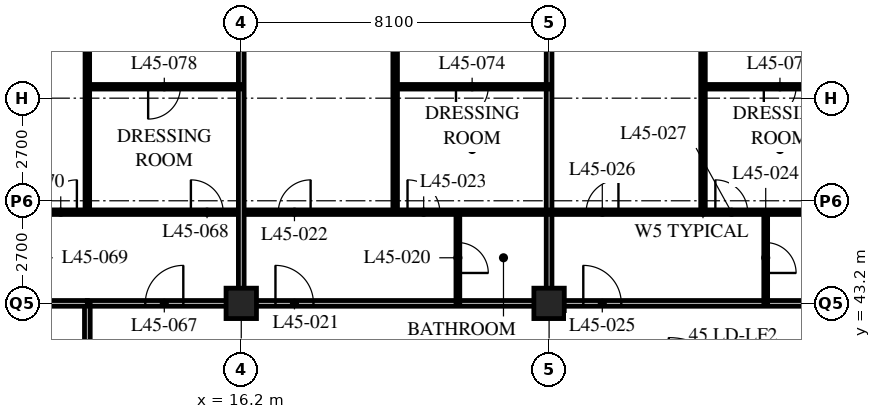
"""IFC4 building model, lengths in metres.
Left out: names, types, materials, properties, quantities, classifications, styles, units other than length and angle.
Written with IfcOpenShell. Run it as: python <this file> out.ifc"""

import sys

from ifc_helpers import new_model, si_unit, direction, frame, frame_2d, origin, origin_2d, place, context, subcontext, project, spatial, rectangle, hollow_rectangle, extrude, element, fill, save


model = new_model("IFC4")
c1 = context("Model", 3, precision=1e-05, world=origin(), true_north=direction((0.0, 1.0)))
c2 = subcontext(c1, "Body", "Model", "MODEL_VIEW")
j1 = project(units=[si_unit("LENGTHUNIT", "METRE"), si_unit("PLANEANGLEUNIT", "RADIAN")], contexts=[c1])
p1 = place(None, origin())
s1 = spatial("IfcSite", under=j1, at=p1, CompositionType="ELEMENT")
p2 = place(p1, origin())
s2 = spatial("IfcBuilding", under=s1, at=p2, CompositionType="ELEMENT")
p3 = place(p2, frame((0.0, 0.0, 177.6)))
s3 = spatial("IfcBuildingStorey", under=s2, at=p3, CompositionType="ELEMENT", Elevation=177.6)
for number, where, z_axis, x_axis in (
    (1, (16.2, 43.2, 0.0), (0.0, 0.0, 1.0), (1.0, 0.0, 0.0)),
    (2, (24.3, 43.2, 0.0), (0.0, 0.0, 1.0), (1.0, 0.0, 0.0)),
):
    element("IfcColumn", number, at=place(p3, frame(where, z_axis=z_axis, x_axis=x_axis)), inside=s3, PredefinedType="COLUMN", context=c2, shape_type="SweptSolid", body=[
        extrude(hollow_rectangle(XDim=0.8, YDim=0.8, WallThickness=0.08, at=origin_2d()), origin(), (0.0, 0.0, 1.0), 3.6),
    ])
p4 = place(p3, frame((12.15, 43.2, 0.0), z_axis=(0.0, 0.0, 1.0), x_axis=(1.0, 0.0, 0.0)))
e3 = element("IfcWall", 3, at=p4, inside=s3, PredefinedType="PARTITIONING", context=c2, shape_type="SweptSolid", body=[
    extrude(rectangle(XDim=32.4, YDim=0.15, at=frame_2d((16.2, 0.0))), origin(), (0.0, 0.0, 1.0), 2.778),
])
p5 = place(p4, frame((4.95, 0.0, 0.0)))
e4 = element("IfcOpeningElement", 4, at=p5, cuts=e3, PredefinedType="OPENING", context=c2, shape_type="SweptSolid", body=[
    extrude(rectangle(XDim=1.0, YDim=2.1, at=frame_2d((0.5, 1.05))), frame((0.0, 0.085, 0.0), z_axis=(0.0, -1.0, 0.0), x_axis=(1.0, 0.0, 0.0)), (0.0, 0.0, 1.0), 0.17),
])
p6 = place(p4, frame((13.05, 0.0, 0.0)))
e5 = element("IfcOpeningElement", 5, at=p6, cuts=e3, PredefinedType="OPENING", context=c2, shape_type="SweptSolid", body=[
    extrude(rectangle(XDim=1.0, YDim=2.1, at=frame_2d((0.5, 1.05))), frame((0.0, 0.085, 0.0), z_axis=(0.0, -1.0, 0.0), x_axis=(1.0, 0.0, 0.0)), (0.0, 0.0, 1.0), 0.17),
])
p7 = place(p4, frame((21.15, 0.0, 0.0)))
e6 = element("IfcOpeningElement", 6, at=p7, cuts=e3, PredefinedType="OPENING", context=c2, shape_type="SweptSolid", body=[
    extrude(rectangle(XDim=1.0, YDim=2.1, at=frame_2d((0.5, 1.05))), frame((0.0, 0.085, 0.0), z_axis=(0.0, -1.0, 0.0), x_axis=(1.0, 0.0, 0.0)), (0.0, 0.0, 1.0), 0.17),
])
p8 = place(p4, frame((29.875, 0.0, 0.0)))
e7 = element("IfcOpeningElement", 7, at=p8, cuts=e3, PredefinedType="OPENING", context=c2, shape_type="SweptSolid", body=[
    extrude(rectangle(XDim=1.0, YDim=2.1, at=frame_2d((0.5, 1.05))), frame((0.0, 0.085, 0.0), z_axis=(0.0, -1.0, 0.0), x_axis=(1.0, 0.0, 0.0)), (0.0, 0.0, 1.0), 0.17),
])
p9 = place(p4, frame((1.525, 0.0, 0.0)))
e8 = element("IfcOpeningElement", 8, at=p9, cuts=e3, PredefinedType="OPENING", context=c2, shape_type="SweptSolid", body=[
    extrude(rectangle(XDim=1.0, YDim=2.1, at=frame_2d((0.5, 1.05))), frame((0.0, 0.085, 0.0), z_axis=(0.0, -1.0, 0.0), x_axis=(1.0, 0.0, 0.0)), (0.0, 0.0, 1.0), 0.17),
])
p10 = place(p3, frame((12.15, 18.9, 0.0), z_axis=(0.0, 0.0, 1.0), x_axis=(0.0, 1.0, 0.0)))
e9 = element("IfcWall", 9, at=p10, inside=s3, PredefinedType="PARTITIONING", context=c2, shape_type="SweptSolid", body=[
    extrude(rectangle(XDim=24.3, YDim=0.15, at=frame_2d((12.15, 0.0))), origin(), (0.0, 0.0, 1.0), 3.39),
])
p11 = place(p10, frame((2.35, 0.0, 0.0)))
e10 = element("IfcOpeningElement", 10, at=p11, cuts=e9, PredefinedType="OPENING", context=c2, shape_type="SweptSolid", body=[
    extrude(rectangle(XDim=1.0, YDim=2.1, at=frame_2d((0.5, 1.05))), frame((0.0, 0.085, 0.0), z_axis=(0.0, -1.0, 0.0), x_axis=(1.0, 0.0, 0.0)), (0.0, 0.0, 1.0), 0.17),
])
p12 = place(p10, frame((6.4, 0.0, 0.0)))
e11 = element("IfcOpeningElement", 11, at=p12, cuts=e9, PredefinedType="OPENING", context=c2, shape_type="SweptSolid", body=[
    extrude(rectangle(XDim=1.0, YDim=2.1, at=frame_2d((0.5, 1.05))), frame((0.0, 0.085, 0.0), z_axis=(0.0, -1.0, 0.0), x_axis=(1.0, 0.0, 0.0)), (0.0, 0.0, 1.0), 0.17),
])
p13 = place(p10, frame((8.5, 0.0, 0.0)))
e12 = element("IfcOpeningElement", 12, at=p13, cuts=e9, PredefinedType="OPENING", context=c2, shape_type="SweptSolid", body=[
    extrude(rectangle(XDim=1.0, YDim=2.1, at=frame_2d((0.5, 1.05))), frame((0.0, 0.085, 0.0), z_axis=(0.0, -1.0, 0.0), x_axis=(1.0, 0.0, 0.0)), (0.0, 0.0, 1.0), 0.17),
])
p14 = place(p10, frame((16.6, 0.0, 0.0)))
e13 = element("IfcOpeningElement", 13, at=p14, cuts=e9, PredefinedType="OPENING", context=c2, shape_type="SweptSolid", body=[
    extrude(rectangle(XDim=1.0, YDim=2.1, at=frame_2d((0.5, 1.05))), frame((0.0, 0.085, 0.0), z_axis=(0.0, -1.0, 0.0), x_axis=(1.0, 0.0, 0.0)), (0.0, 0.0, 1.0), 0.17),
])
p15 = place(p3, frame((21.9, 43.2, 0.0), z_axis=(0.0, 0.0, 1.0), x_axis=(0.0, 1.0, 0.0)))
e14 = element("IfcWall", 14, at=p15, inside=s3, PredefinedType="PARTITIONING", context=c2, shape_type="SweptSolid", body=[
    extrude(rectangle(XDim=2.4, YDim=0.1, at=frame_2d((1.2, 0.0))), origin(), (0.0, 0.0, 1.0), 3.39),
])
p16 = place(p15, frame((0.8, 0.0, 0.0)))
e15 = element("IfcOpeningElement", 15, at=p16, cuts=e14, PredefinedType="OPENING", context=c2, shape_type="SweptSolid", body=[
    extrude(rectangle(XDim=0.8, YDim=2.1, at=frame_2d((0.4, 1.05))), frame((0.0, 0.06, 0.0), z_axis=(0.0, -1.0, 0.0), x_axis=(1.0, 0.0, 0.0)), (0.0, 0.0, 1.0), 0.12),
])
p17 = place(p3, frame((20.25, 45.6, 0.0), z_axis=(0.0, 0.0, 1.0), x_axis=(0.0, 1.0, 0.0)))
e16 = element("IfcWall", 16, at=p17, inside=s3, PredefinedType="PARTITIONING", context=c2, shape_type="SweptSolid", body=[
    extrude(rectangle(XDim=13.5, YDim=0.12, at=frame_2d((6.75, 0.0))), origin(), (0.0, 0.0, 1.0), 3.39),
])
p18 = place(p3, frame((24.3, 43.2, 0.0), z_axis=(0.0, 0.0, 1.0), x_axis=(0.0, 1.0, 0.0)))
e17 = element("IfcWall", 17, at=p18, inside=s3, PredefinedType="PARTITIONING", context=c2, shape_type="SweptSolid", body=[
    extrude(rectangle(XDim=15.9, YDim=0.15, at=frame_2d((7.95, 0.0))), origin(), (0.0, 0.0, 1.0), 2.778),
])
p19 = place(p3, frame((30.0, 43.2, 0.0), z_axis=(0.0, 0.0, 1.0), x_axis=(0.0, 1.0, 0.0)))
e18 = element("IfcWall", 18, at=p19, inside=s3, PredefinedType="PARTITIONING", context=c2, shape_type="SweptSolid", body=[
    extrude(rectangle(XDim=2.4, YDim=0.1, at=frame_2d((1.2, 0.0))), origin(), (0.0, 0.0, 1.0), 3.39),
])
p20 = place(p19, frame((0.8, 0.0, 0.0)))
e19 = element("IfcOpeningElement", 19, at=p20, cuts=e18, PredefinedType="OPENING", context=c2, shape_type="SweptSolid", body=[
    extrude(rectangle(XDim=0.8, YDim=2.1, at=frame_2d((0.4, 1.05))), frame((0.0, 0.06, 0.0), z_axis=(0.0, -1.0, 0.0), x_axis=(1.0, 0.0, 0.0)), (0.0, 0.0, 1.0), 0.12),
])
p21 = place(p3, frame((28.35, 45.6, 0.0), z_axis=(0.0, 0.0, 1.0), x_axis=(0.0, 1.0, 0.0)))
e20 = element("IfcWall", 20, at=p21, inside=s3, PredefinedType="PARTITIONING", context=c2, shape_type="SweptSolid", body=[
    extrude(rectangle(XDim=13.5, YDim=0.12, at=frame_2d((6.75, 0.0))), origin(), (0.0, 0.0, 1.0), 3.39),
])
p22 = place(p3, frame((8.15, 45.6, 0.0), z_axis=(0.0, 0.0, 1.0), x_axis=(1.0, 0.0, 0.0)))
e21 = element("IfcWall", 21, at=p22, inside=s3, PredefinedType="PARTITIONING", context=c2, shape_type="SweptSolid", body=[
    extrude(rectangle(XDim=40.4, YDim=0.12, at=frame_2d((20.2, 0.0))), origin(), (0.0, 0.0, 1.0), 3.39),
])
p23 = place(p22, frame((9.025, 0.0, 0.0)))
e22 = element("IfcOpeningElement", 22, at=p23, cuts=e21, PredefinedType="OPENING", context=c2, shape_type="SweptSolid", body=[
    extrude(rectangle(XDim=0.85, YDim=2.1, at=frame_2d((0.425, 1.05))), frame((0.0, 0.07, 0.0), z_axis=(0.0, -1.0, 0.0), x_axis=(1.0, 0.0, 0.0)), (0.0, 0.0, 1.0), 0.14),
])
p24 = place(p22, frame((12.425, 0.0, 0.0)))
e23 = element("IfcOpeningElement", 23, at=p24, cuts=e21, PredefinedType="OPENING", context=c2, shape_type="SweptSolid", body=[
    extrude(rectangle(XDim=0.85, YDim=2.1, at=frame_2d((0.425, 1.05))), frame((0.0, 0.07, 0.0), z_axis=(0.0, -1.0, 0.0), x_axis=(1.0, 0.0, 0.0)), (0.0, 0.0, 1.0), 0.14),
])
p25 = place(p22, frame((17.125, 0.0, 0.0)))
e24 = element("IfcOpeningElement", 24, at=p25, cuts=e21, PredefinedType="OPENING", context=c2, shape_type="SweptSolid", body=[
    extrude(rectangle(XDim=0.85, YDim=2.1, at=frame_2d((0.425, 1.05))), frame((0.0, 0.07, 0.0), z_axis=(0.0, -1.0, 0.0), x_axis=(1.0, 0.0, 0.0)), (0.0, 0.0, 1.0), 0.14),
])
p26 = place(p22, frame((20.525, 0.0, 0.0)))
e25 = element("IfcOpeningElement", 25, at=p26, cuts=e21, PredefinedType="OPENING", context=c2, shape_type="SweptSolid", body=[
    extrude(rectangle(XDim=0.85, YDim=2.1, at=frame_2d((0.425, 1.05))), frame((0.0, 0.07, 0.0), z_axis=(0.0, -1.0, 0.0), x_axis=(1.0, 0.0, 0.0)), (0.0, 0.0, 1.0), 0.14),
])
p27 = place(p22, frame((25.225, 0.0, 0.0)))
e26 = element("IfcOpeningElement", 26, at=p27, cuts=e21, PredefinedType="OPENING", context=c2, shape_type="SweptSolid", body=[
    extrude(rectangle(XDim=0.85, YDim=2.1, at=frame_2d((0.425, 1.05))), frame((0.0, 0.07, 0.0), z_axis=(0.0, -1.0, 0.0), x_axis=(1.0, 0.0, 0.0)), (0.0, 0.0, 1.0), 0.14),
])
p28 = place(p22, frame((28.625, 0.0, 0.0)))
e27 = element("IfcOpeningElement", 27, at=p28, cuts=e21, PredefinedType="OPENING", context=c2, shape_type="SweptSolid", body=[
    extrude(rectangle(XDim=0.85, YDim=2.1, at=frame_2d((0.425, 1.05))), frame((0.0, 0.07, 0.0), z_axis=(0.0, -1.0, 0.0), x_axis=(1.0, 0.0, 0.0)), (0.0, 0.0, 1.0), 0.14),
])
p29 = place(p22, frame((32.825, 0.0, 0.0)))
e28 = element("IfcOpeningElement", 28, at=p29, cuts=e21, PredefinedType="OPENING", context=c2, shape_type="SweptSolid", body=[
    extrude(rectangle(XDim=0.85, YDim=2.1, at=frame_2d((0.425, 1.05))), frame((0.0, 0.07, 0.0), z_axis=(0.0, -1.0, 0.0), x_axis=(1.0, 0.0, 0.0)), (0.0, 0.0, 1.0), 0.14),
])
p30 = place(p22, frame((36.675, 0.0, 0.0)))
e29 = element("IfcOpeningElement", 29, at=p30, cuts=e21, PredefinedType="OPENING", context=c2, shape_type="SweptSolid", body=[
    extrude(rectangle(XDim=0.85, YDim=2.1, at=frame_2d((0.425, 1.05))), frame((0.0, 0.07, 0.0), z_axis=(0.0, -1.0, 0.0), x_axis=(1.0, 0.0, 0.0)), (0.0, 0.0, 1.0), 0.14),
])
p31 = place(p22, frame((6.725, 0.0, 0.0)))
e30 = element("IfcOpeningElement", 30, at=p31, cuts=e21, PredefinedType="OPENING", context=c2, shape_type="SweptSolid", body=[
    extrude(rectangle(XDim=0.85, YDim=2.1, at=frame_2d((0.425, 1.05))), frame((0.0, 0.07, 0.0), z_axis=(0.0, -1.0, 0.0), x_axis=(1.0, 0.0, 0.0)), (0.0, 0.0, 1.0), 0.14),
])
p32 = place(p22, frame((2.875, 0.0, 0.0)))
e31 = element("IfcOpeningElement", 31, at=p32, cuts=e21, PredefinedType="OPENING", context=c2, shape_type="SweptSolid", body=[
    extrude(rectangle(XDim=0.85, YDim=2.1, at=frame_2d((0.425, 1.05))), frame((0.0, 0.07, 0.0), z_axis=(0.0, -1.0, 0.0), x_axis=(1.0, 0.0, 0.0)), (0.0, 0.0, 1.0), 0.14),
])
p33 = place(p3, frame((12.15, 45.6, 0.0), z_axis=(0.0, 0.0, 1.0), x_axis=(0.0, 1.0, 0.0)))
e32 = element("IfcWall", 32, at=p33, inside=s3, PredefinedType="PARTITIONING", context=c2, shape_type="SweptSolid", body=[
    extrude(rectangle(XDim=13.5, YDim=0.12, at=frame_2d((6.75, 0.0))), origin(), (0.0, 0.0, 1.0), 3.39),
])
p34 = place(p3, frame((0.3, 43.2, 0.0), z_axis=(0.0, 0.0, 1.0), x_axis=(1.0, 0.0, 0.0)))
e33 = element("IfcWall", 33, at=p34, inside=s3, PredefinedType="PARTITIONING", context=c2, shape_type="SweptSolid", body=[
    extrude(rectangle(XDim=11.85, YDim=0.15, at=frame_2d((5.925, 0.0))), origin(), (0.0, 0.0, 1.0), 2.778),
])
p35 = place(p3, frame((16.2, 43.2, 0.0), z_axis=(0.0, 0.0, 1.0), x_axis=(0.0, 1.0, 0.0)))
e34 = element("IfcWall", 34, at=p35, inside=s3, PredefinedType="PARTITIONING", context=c2, shape_type="SweptSolid", body=[
    extrude(rectangle(XDim=15.9, YDim=0.15, at=frame_2d((7.95, 0.0))), origin(), (0.0, 0.0, 1.0), 2.778),
])
p36 = place(p3, frame((20.25, 48.9, 0.0), z_axis=(0.0, 0.0, 1.0), x_axis=(1.0, 0.0, 0.0)))
e35 = element("IfcWall", 35, at=p36, inside=s3, PredefinedType="PARTITIONING", context=c2, shape_type="SweptSolid", body=[
    extrude(rectangle(XDim=4.05, YDim=0.12, at=frame_2d((2.025, 0.0))), origin(), (0.0, 0.0, 1.0), 3.39),
])
p37 = place(p36, frame((1.6, 0.0, 0.0)))
e36 = element("IfcOpeningElement", 36, at=p37, cuts=e35, PredefinedType="OPENING", context=c2, shape_type="SweptSolid", body=[
    extrude(rectangle(XDim=0.85, YDim=2.1, at=frame_2d((0.425, 1.05))), frame((0.0, 0.07, 0.0), z_axis=(0.0, -1.0, 0.0), x_axis=(1.0, 0.0, 0.0)), (0.0, 0.0, 1.0), 0.14),
])
p38 = place(p3, frame((28.35, 48.9, 0.0), z_axis=(0.0, 0.0, 1.0), x_axis=(1.0, 0.0, 0.0)))
e37 = element("IfcWall", 37, at=p38, inside=s3, PredefinedType="PARTITIONING", context=c2, shape_type="SweptSolid", body=[
    extrude(rectangle(XDim=4.05, YDim=0.12, at=frame_2d((2.025, 0.0))), origin(), (0.0, 0.0, 1.0), 3.39),
])
p39 = place(p38, frame((1.6, 0.0, 0.0)))
e38 = element("IfcOpeningElement", 38, at=p39, cuts=e37, PredefinedType="OPENING", context=c2, shape_type="SweptSolid", body=[
    extrude(rectangle(XDim=0.85, YDim=2.1, at=frame_2d((0.425, 1.05))), frame((0.0, 0.07, 0.0), z_axis=(0.0, -1.0, 0.0), x_axis=(1.0, 0.0, 0.0)), (0.0, 0.0, 1.0), 0.14),
])
p40 = place(p3, frame((12.15, 48.9, 0.0), z_axis=(0.0, 0.0, 1.0), x_axis=(1.0, 0.0, 0.0)))
e39 = element("IfcWall", 39, at=p40, inside=s3, PredefinedType="PARTITIONING", context=c2, shape_type="SweptSolid", body=[
    extrude(rectangle(XDim=4.05, YDim=0.12, at=frame_2d((2.025, 0.0))), origin(), (0.0, 0.0, 1.0), 3.39),
])
p41 = place(p40, frame((1.6, 0.0, 0.0)))
e40 = element("IfcOpeningElement", 40, at=p41, cuts=e39, PredefinedType="OPENING", context=c2, shape_type="SweptSolid", body=[
    extrude(rectangle(XDim=0.85, YDim=2.1, at=frame_2d((0.425, 1.05))), frame((0.0, 0.07, 0.0), z_axis=(0.0, -1.0, 0.0), x_axis=(1.0, 0.0, 0.0)), (0.0, 0.0, 1.0), 0.14),
])
p42 = place(p16, origin())
e41 = element("IfcDoor", 41, at=p42, inside=s3, OperationType="SINGLE_SWING_RIGHT", PredefinedType="DOOR", context=c2, shape_type="SweptSolid", body=[
    extrude(rectangle(XDim=0.8, YDim=2.1, at=frame_2d((0.4, 1.05))), frame((0.0, 0.025, 0.0), z_axis=(0.0, -1.0, 0.0), x_axis=(1.0, 0.0, 0.0)), (0.0, 0.0, 1.0), 0.05),
])
fill(e15, e41)
p43 = place(p5, origin())
e42 = element("IfcDoor", 42, at=p43, inside=s3, OperationType="SINGLE_SWING_LEFT", PredefinedType="DOOR", context=c2, shape_type="SweptSolid", body=[
    extrude(rectangle(XDim=1.0, YDim=2.1, at=frame_2d((0.5, 1.05))), frame((0.0, 0.025, 0.0), z_axis=(0.0, -1.0, 0.0), x_axis=(1.0, 0.0, 0.0)), (0.0, 0.0, 1.0), 0.05),
])
fill(e4, e42)
p44 = place(p23, origin())
e43 = element("IfcDoor", 43, at=p44, inside=s3, OperationType="SINGLE_SWING_RIGHT", PredefinedType="DOOR", context=c2, shape_type="SweptSolid", body=[
    extrude(rectangle(XDim=0.85, YDim=2.1, at=frame_2d((0.425, 1.05))), frame((0.0, 0.025, 0.0), z_axis=(0.0, -1.0, 0.0), x_axis=(1.0, 0.0, 0.0)), (0.0, 0.0, 1.0), 0.05),
])
fill(e22, e43)
p45 = place(p24, origin())
e44 = element("IfcDoor", 44, at=p45, inside=s3, OperationType="SINGLE_SWING_LEFT", PredefinedType="DOOR", context=c2, shape_type="SweptSolid", body=[
    extrude(rectangle(XDim=0.85, YDim=2.1, at=frame_2d((0.425, 1.05))), frame((0.0, 0.025, 0.0), z_axis=(0.0, -1.0, 0.0), x_axis=(1.0, 0.0, 0.0)), (0.0, 0.0, 1.0), 0.05),
])
fill(e23, e44)
p46 = place(p20, origin())
e45 = element("IfcDoor", 45, at=p46, inside=s3, OperationType="SINGLE_SWING_RIGHT", PredefinedType="DOOR", context=c2, shape_type="SweptSolid", body=[
    extrude(rectangle(XDim=0.8, YDim=2.1, at=frame_2d((0.4, 1.05))), frame((0.0, 0.025, 0.0), z_axis=(0.0, -1.0, 0.0), x_axis=(1.0, 0.0, 0.0)), (0.0, 0.0, 1.0), 0.05),
])
fill(e19, e45)
p47 = place(p6, origin())
e46 = element("IfcDoor", 46, at=p47, inside=s3, OperationType="SINGLE_SWING_LEFT", PredefinedType="DOOR", context=c2, shape_type="SweptSolid", body=[
    extrude(rectangle(XDim=1.0, YDim=2.1, at=frame_2d((0.5, 1.05))), frame((0.0, 0.025, 0.0), z_axis=(0.0, -1.0, 0.0), x_axis=(1.0, 0.0, 0.0)), (0.0, 0.0, 1.0), 0.05),
])
fill(e5, e46)
p48 = place(p25, origin())
e47 = element("IfcDoor", 47, at=p48, inside=s3, OperationType="SINGLE_SWING_RIGHT", PredefinedType="DOOR", context=c2, shape_type="SweptSolid", body=[
    extrude(rectangle(XDim=0.85, YDim=2.1, at=frame_2d((0.425, 1.05))), frame((0.0, 0.025, 0.0), z_axis=(0.0, -1.0, 0.0), x_axis=(1.0, 0.0, 0.0)), (0.0, 0.0, 1.0), 0.05),
])
fill(e24, e47)
p49 = place(p26, origin())
e48 = element("IfcDoor", 48, at=p49, inside=s3, OperationType="SINGLE_SWING_LEFT", PredefinedType="DOOR", context=c2, shape_type="SweptSolid", body=[
    extrude(rectangle(XDim=0.85, YDim=2.1, at=frame_2d((0.425, 1.05))), frame((0.0, 0.025, 0.0), z_axis=(0.0, -1.0, 0.0), x_axis=(1.0, 0.0, 0.0)), (0.0, 0.0, 1.0), 0.05),
])
fill(e25, e48)
p50 = place(p9, origin())
e49 = element("IfcDoor", 49, at=p50, inside=s3, OperationType="SINGLE_SWING_RIGHT", PredefinedType="DOOR", context=c2, shape_type="SweptSolid", body=[
    extrude(rectangle(XDim=1.0, YDim=2.1, at=frame_2d((0.5, 1.05))), frame((0.0, 0.025, 0.0), z_axis=(0.0, -1.0, 0.0), x_axis=(1.0, 0.0, 0.0)), (0.0, 0.0, 1.0), 0.05),
])
fill(e8, e49)
p51 = place(p31, origin())
e50 = element("IfcDoor", 50, at=p51, inside=s3, OperationType="SINGLE_SWING_LEFT", PredefinedType="DOOR", context=c2, shape_type="SweptSolid", body=[
    extrude(rectangle(XDim=0.85, YDim=2.1, at=frame_2d((0.425, 1.05))), frame((0.0, 0.025, 0.0), z_axis=(0.0, -1.0, 0.0), x_axis=(1.0, 0.0, 0.0)), (0.0, 0.0, 1.0), 0.05),
])
fill(e30, e50)
p52 = place(p32, origin())
e51 = element("IfcDoor", 51, at=p52, inside=s3, OperationType="SINGLE_SWING_RIGHT", PredefinedType="DOOR", context=c2, shape_type="SweptSolid", body=[
    extrude(rectangle(XDim=0.85, YDim=2.1, at=frame_2d((0.425, 1.05))), frame((0.0, 0.025, 0.0), z_axis=(0.0, -1.0, 0.0), x_axis=(1.0, 0.0, 0.0)), (0.0, 0.0, 1.0), 0.05),
])
fill(e31, e51)
p53 = place(p37, origin())
e52 = element("IfcDoor", 52, at=p53, inside=s3, OperationType="SINGLE_SWING_RIGHT", PredefinedType="DOOR", context=c2, shape_type="SweptSolid", body=[
    extrude(rectangle(XDim=0.85, YDim=2.1, at=frame_2d((0.425, 1.05))), frame((0.0, 0.025, 0.0), z_axis=(0.0, -1.0, 0.0), x_axis=(1.0, 0.0, 0.0)), (0.0, 0.0, 1.0), 0.05),
])
fill(e36, e52)
p54 = place(p39, origin())
e53 = element("IfcDoor", 53, at=p54, inside=s3, OperationType="SINGLE_SWING_RIGHT", PredefinedType="DOOR", context=c2, shape_type="SweptSolid", body=[
    extrude(rectangle(XDim=0.85, YDim=2.1, at=frame_2d((0.425, 1.05))), frame((0.0, 0.025, 0.0), z_axis=(0.0, -1.0, 0.0), x_axis=(1.0, 0.0, 0.0)), (0.0, 0.0, 1.0), 0.05),
])
fill(e38, e53)
p55 = place(p41, origin())
e54 = element("IfcDoor", 54, at=p55, inside=s3, OperationType="SINGLE_SWING_RIGHT", PredefinedType="DOOR", context=c2, shape_type="SweptSolid", body=[
    extrude(rectangle(XDim=0.85, YDim=2.1, at=frame_2d((0.425, 1.05))), frame((0.0, 0.025, 0.0), z_axis=(0.0, -1.0, 0.0), x_axis=(1.0, 0.0, 0.0)), (0.0, 0.0, 1.0), 0.05),
])
fill(e40, e54)
save(model, sys.argv[1])
